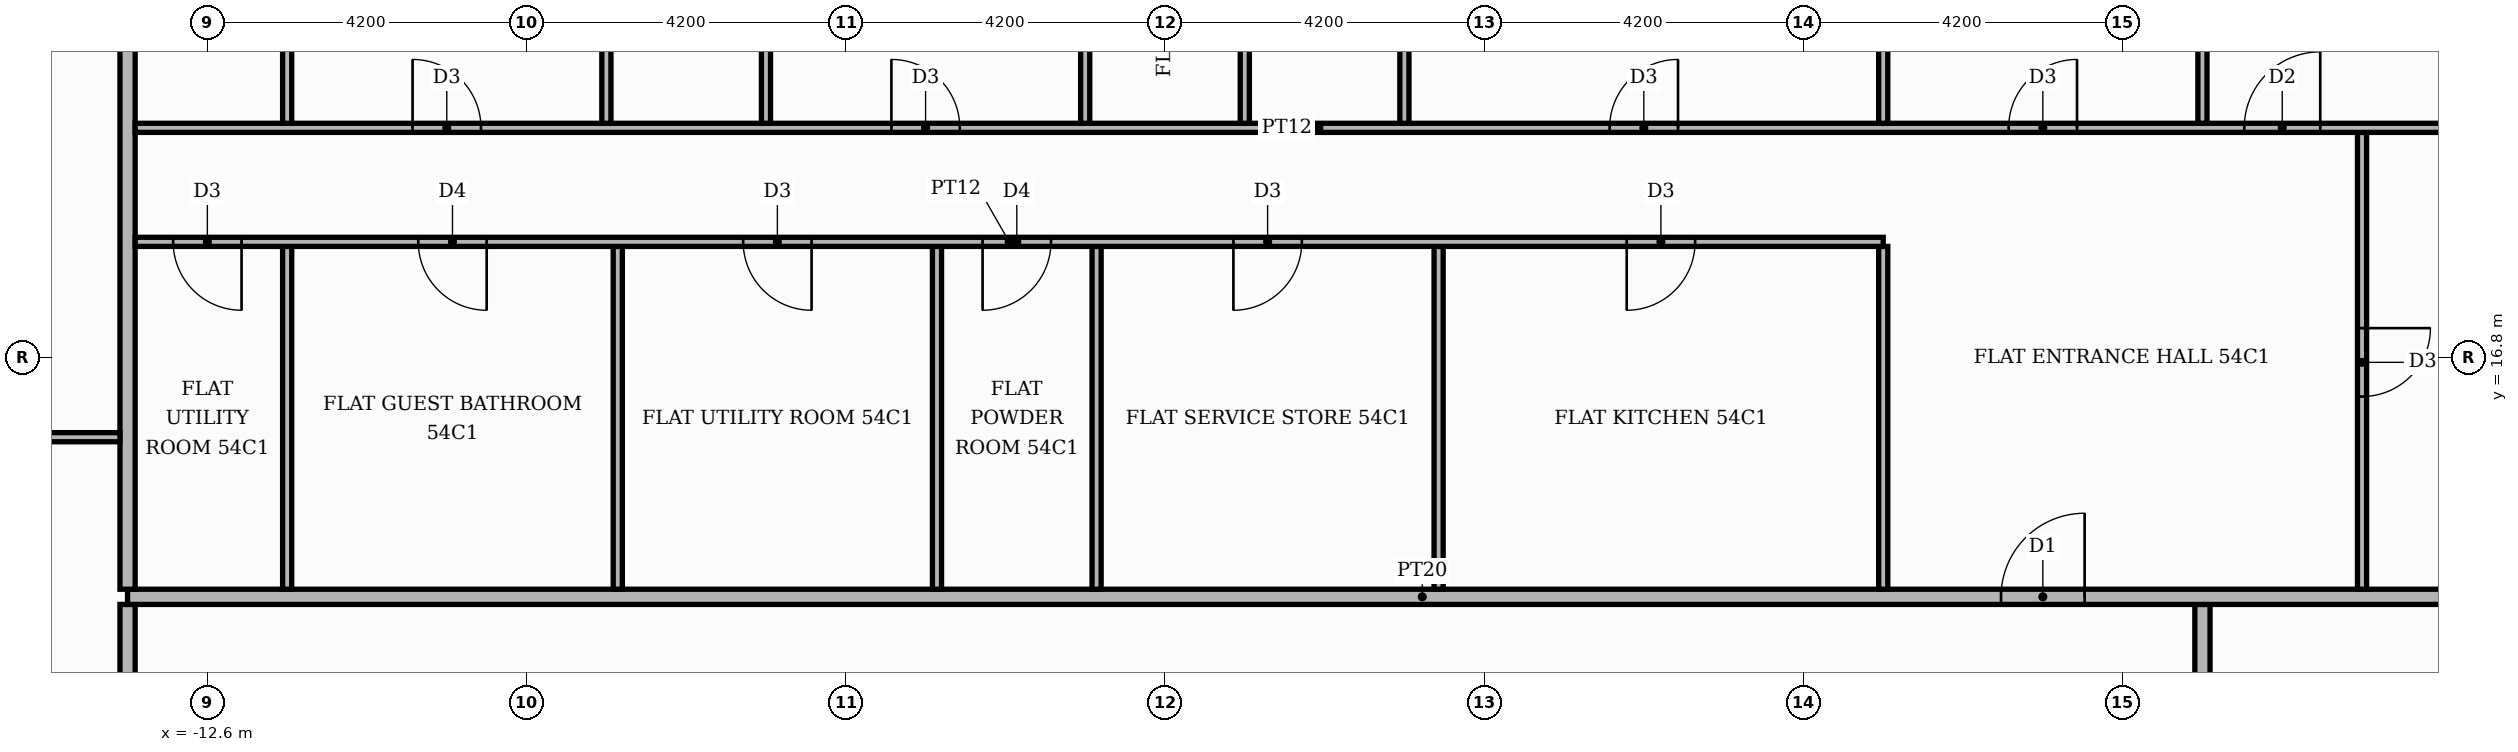
"""IFC4 building model, lengths in metres.
Left out: names, types, materials, properties, quantities, classifications, styles, units other than length and angle.
Written with IfcOpenShell. Run it as: python <this file> out.ifc"""

import sys

from ifc_helpers import new_model, si_unit, direction, frame, frame_2d, origin, place, context, subcontext, project, spatial, rectangle, extrude, element, fill, save


model = new_model("IFC4")
c1 = context("Model", 3, precision=1e-05, world=origin(), true_north=direction((0.0, 1.0)))
c2 = subcontext(c1, "Body", "Model", "MODEL_VIEW")
j1 = project(units=[si_unit("LENGTHUNIT", "METRE"), si_unit("PLANEANGLEUNIT", "RADIAN")], contexts=[c1])
p1 = place(None, origin())
s1 = spatial("IfcSite", under=j1, at=p1, CompositionType="ELEMENT")
p2 = place(p1, origin())
s2 = spatial("IfcBuilding", under=s1, at=p2, CompositionType="ELEMENT")
p3 = place(p2, frame((0.0, 0.0, 227.4)))
s3 = spatial("IfcBuildingStorey", under=s2, at=p3, CompositionType="ELEMENT", Elevation=227.4)
p4 = place(p3, frame((-13.65, -13.55, 0.0), z_axis=(0.0, 0.0, 1.0), x_axis=(0.0, 1.0, 0.0)))
e1 = element("IfcWall", 1, at=p4, inside=s3, PredefinedType="PARTITIONING", context=c2, shape_type="SweptSolid", body=[
    extrude(rectangle(XDim=27.1, YDim=0.2, at=frame_2d((13.55, 0.0))), origin(), (0.0, 0.0, 1.0), 3.48),
])
p5 = place(p4, frame((24.55, 0.0, 0.0)))
e2 = element("IfcOpeningElement", 2, at=p5, cuts=e1, PredefinedType="OPENING", context=c2, shape_type="SweptSolid", body=[
    extrude(rectangle(XDim=1.1, YDim=2.4, at=frame_2d((0.55, 1.2))), frame((0.0, 0.11, 0.0), z_axis=(0.0, -1.0, 0.0), x_axis=(1.0, 0.0, 0.0)), (0.0, 0.0, 1.0), 0.22),
])
p6 = place(p3, frame((13.65, 11.1, 0.0), z_axis=(0.0, 0.0, 1.0), x_axis=(0.0, 1.0, 0.0)))
e3 = element("IfcWall", 3, at=p6, inside=s3, PredefinedType="PARTITIONING", context=c2, shape_type="SweptSolid", body=[
    extrude(rectangle(XDim=2.45, YDim=0.2, at=frame_2d((1.225, 0.0))), origin(), (0.0, 0.0, 1.0), 3.48),
])
p7 = place(p3, frame((-13.65, 13.65, 0.0), z_axis=(0.0, 0.0, 1.0), x_axis=(1.0, 0.0, 0.0)))
e4 = element("IfcWall", 4, at=p7, inside=s3, PredefinedType="PARTITIONING", context=c2, shape_type="SweptSolid", body=[
    extrude(rectangle(XDim=34.07, YDim=0.2, at=frame_2d((17.035, 0.0))), origin(), (0.0, 0.0, 1.0), 3.48),
])
p8 = place(p7, frame((24.65, 0.0, 0.0)))
e5 = element("IfcOpeningElement", 5, at=p8, cuts=e4, PredefinedType="OPENING", context=c2, shape_type="SweptSolid", body=[
    extrude(rectangle(XDim=1.1, YDim=2.4, at=frame_2d((0.55, 1.2))), frame((0.0, 0.11, 0.0), z_axis=(0.0, -1.0, 0.0), x_axis=(1.0, 0.0, 0.0)), (0.0, 0.0, 1.0), 0.22),
])
p9 = place(p3, frame((-13.65, 13.75, 0.0), z_axis=(0.0, 0.0, 1.0), x_axis=(0.0, 1.0, 0.0)))
e6 = element("IfcWall", 6, at=p9, inside=s3, PredefinedType="PARTITIONING", context=c2, shape_type="SweptSolid", body=[
    extrude(rectangle(XDim=11.67, YDim=0.2, at=frame_2d((5.835, 0.0))), origin(), (0.0, 0.0, 1.0), 3.48),
])
for number, where, z_axis, x_axis in (
    (7, (-11.55, 13.75, 0.0), (0.0, 0.0, 1.0), (0.0, 1.0, 0.0)),
    (8, (-7.2, 13.75, 0.0), (0.0, 0.0, 1.0), (0.0, 1.0, 0.0)),
    (9, (-3.0, 13.75, 0.0), (0.0, 0.0, 1.0), (0.0, 1.0, 0.0)),
    (10, (-0.9, 13.75, 0.0), (0.0, 0.0, 1.0), (0.0, 1.0, 0.0)),
    (11, (3.6, 13.75, 0.0), (0.0, 0.0, 1.0), (0.0, 1.0, 0.0)),
    (12, (9.45, 13.75, 0.0), (0.0, 0.0, 1.0), (0.0, 1.0, 0.0)),
):
    element("IfcWall", number, at=place(p3, frame(where, z_axis=z_axis, x_axis=x_axis)), inside=s3, PredefinedType="PARTITIONING", context=c2, shape_type="SweptSolid", body=[
        extrude(rectangle(XDim=4.51, YDim=0.12, at=frame_2d((2.255, 0.0))), origin(), (0.0, 0.0, 1.0), 3.48),
    ])
p10 = place(p3, frame((15.75, 13.75, 0.0), z_axis=(0.0, 0.0, 1.0), x_axis=(0.0, 1.0, 0.0)))
e13 = element("IfcWall", 13, at=p10, inside=s3, PredefinedType="PARTITIONING", context=c2, shape_type="SweptSolid", body=[
    extrude(rectangle(XDim=6.01, YDim=0.12, at=frame_2d((3.005, 0.0))), origin(), (0.0, 0.0, 1.0), 3.48),
])
p11 = place(p10, frame((2.535, 0.0, 0.0)))
e14 = element("IfcOpeningElement", 14, at=p11, cuts=e13, PredefinedType="OPENING", context=c2, shape_type="SweptSolid", body=[
    extrude(rectangle(XDim=0.9, YDim=2.1, at=frame_2d((0.45, 1.05))), frame((0.0, 0.07, 0.0), z_axis=(0.0, -1.0, 0.0), x_axis=(1.0, 0.0, 0.0)), (0.0, 0.0, 1.0), 0.14),
])
p12 = place(p3, frame((-20.72, 15.75, 0.0), z_axis=(0.0, 0.0, 1.0), x_axis=(1.0, 0.0, 0.0)))
e15 = element("IfcWall", 15, at=p12, inside=s3, PredefinedType="PARTITIONING", context=c2, shape_type="SweptSolid", body=[
    extrude(rectangle(XDim=6.97, YDim=0.12, at=frame_2d((3.485, 0.0))), origin(), (0.0, 0.0, 1.0), 3.48),
])
p13 = place(p12, frame((3.085, 0.0, 0.0)))
e16 = element("IfcOpeningElement", 16, at=p13, cuts=e15, PredefinedType="OPENING", context=c2, shape_type="SweptSolid", body=[
    extrude(rectangle(XDim=0.9, YDim=2.1, at=frame_2d((0.45, 1.05))), frame((0.0, 0.07, 0.0), z_axis=(0.0, -1.0, 0.0), x_axis=(1.0, 0.0, 0.0)), (0.0, 0.0, 1.0), 0.14),
])
p14 = place(p3, frame((-13.55, 18.32, 0.0), z_axis=(0.0, 0.0, 1.0), x_axis=(1.0, 0.0, 0.0)))
e17 = element("IfcWall", 17, at=p14, inside=s3, PredefinedType="PARTITIONING", context=c2, shape_type="SweptSolid", body=[
    extrude(rectangle(XDim=23.0, YDim=0.12, at=frame_2d((11.5, 0.0))), origin(), (0.0, 0.0, 1.0), 3.48),
])
p15 = place(p14, frame((19.625, 0.0, 0.0)))
e18 = element("IfcOpeningElement", 18, at=p15, cuts=e17, PredefinedType="OPENING", context=c2, shape_type="SweptSolid", body=[
    extrude(rectangle(XDim=0.9, YDim=2.1, at=frame_2d((0.45, 1.05))), frame((0.0, 0.07, 0.0), z_axis=(0.0, -1.0, 0.0), x_axis=(1.0, 0.0, 0.0)), (0.0, 0.0, 1.0), 0.14),
])
p16 = place(p14, frame((14.45, 0.0, 0.0)))
e19 = element("IfcOpeningElement", 19, at=p16, cuts=e17, PredefinedType="OPENING", context=c2, shape_type="SweptSolid", body=[
    extrude(rectangle(XDim=0.9, YDim=2.1, at=frame_2d((0.45, 1.05))), frame((0.0, 0.07, 0.0), z_axis=(0.0, -1.0, 0.0), x_axis=(1.0, 0.0, 0.0)), (0.0, 0.0, 1.0), 0.14),
])
p17 = place(p14, frame((11.15, 0.0, 0.0)))
e20 = element("IfcOpeningElement", 20, at=p17, cuts=e17, PredefinedType="OPENING", context=c2, shape_type="SweptSolid", body=[
    extrude(rectangle(XDim=0.9, YDim=2.1, at=frame_2d((0.45, 1.05))), frame((0.0, 0.07, 0.0), z_axis=(0.0, -1.0, 0.0), x_axis=(1.0, 0.0, 0.0)), (0.0, 0.0, 1.0), 0.14),
])
p18 = place(p14, frame((8.0, 0.0, 0.0)))
e21 = element("IfcOpeningElement", 21, at=p18, cuts=e17, PredefinedType="OPENING", context=c2, shape_type="SweptSolid", body=[
    extrude(rectangle(XDim=0.9, YDim=2.1, at=frame_2d((0.45, 1.05))), frame((0.0, 0.07, 0.0), z_axis=(0.0, -1.0, 0.0), x_axis=(1.0, 0.0, 0.0)), (0.0, 0.0, 1.0), 0.14),
])
p19 = place(p14, frame((3.725, 0.0, 0.0)))
e22 = element("IfcOpeningElement", 22, at=p19, cuts=e17, PredefinedType="OPENING", context=c2, shape_type="SweptSolid", body=[
    extrude(rectangle(XDim=0.9, YDim=2.1, at=frame_2d((0.45, 1.05))), frame((0.0, 0.07, 0.0), z_axis=(0.0, -1.0, 0.0), x_axis=(1.0, 0.0, 0.0)), (0.0, 0.0, 1.0), 0.14),
])
p20 = place(p14, frame((0.5, 0.0, 0.0)))
e23 = element("IfcOpeningElement", 23, at=p20, cuts=e17, PredefinedType="OPENING", context=c2, shape_type="SweptSolid", body=[
    extrude(rectangle(XDim=0.9, YDim=2.1, at=frame_2d((0.45, 1.05))), frame((0.0, 0.07, 0.0), z_axis=(0.0, -1.0, 0.0), x_axis=(1.0, 0.0, 0.0)), (0.0, 0.0, 1.0), 0.14),
])
p21 = place(p3, frame((-13.55, 19.82, 0.0), z_axis=(0.0, 0.0, 1.0), x_axis=(1.0, 0.0, 0.0)))
e24 = element("IfcWall", 24, at=p21, inside=s3, PredefinedType="PARTITIONING", context=c2, shape_type="SweptSolid", body=[
    extrude(rectangle(XDim=31.15, YDim=0.12, at=frame_2d((15.575, 0.0))), origin(), (0.0, 0.0, 1.0), 3.48),
])
p22 = place(p21, frame((27.75, 0.0, 0.0)))
e25 = element("IfcOpeningElement", 25, at=p22, cuts=e24, PredefinedType="OPENING", context=c2, shape_type="SweptSolid", body=[
    extrude(rectangle(XDim=1.0, YDim=2.1, at=frame_2d((0.5, 1.05))), frame((0.0, 0.07, 0.0), z_axis=(0.0, -1.0, 0.0), x_axis=(1.0, 0.0, 0.0)), (0.0, 0.0, 1.0), 0.14),
])
p23 = place(p21, frame((24.65, 0.0, 0.0)))
e26 = element("IfcOpeningElement", 26, at=p23, cuts=e24, PredefinedType="OPENING", context=c2, shape_type="SweptSolid", body=[
    extrude(rectangle(XDim=0.9, YDim=2.1, at=frame_2d((0.45, 1.05))), frame((0.0, 0.07, 0.0), z_axis=(0.0, -1.0, 0.0), x_axis=(1.0, 0.0, 0.0)), (0.0, 0.0, 1.0), 0.14),
])
p24 = place(p21, frame((19.4, 0.0, 0.0)))
e27 = element("IfcOpeningElement", 27, at=p24, cuts=e24, PredefinedType="OPENING", context=c2, shape_type="SweptSolid", body=[
    extrude(rectangle(XDim=0.9, YDim=2.1, at=frame_2d((0.45, 1.05))), frame((0.0, 0.07, 0.0), z_axis=(0.0, -1.0, 0.0), x_axis=(1.0, 0.0, 0.0)), (0.0, 0.0, 1.0), 0.14),
])
p25 = place(p21, frame((9.95, 0.0, 0.0)))
e28 = element("IfcOpeningElement", 28, at=p25, cuts=e24, PredefinedType="OPENING", context=c2, shape_type="SweptSolid", body=[
    extrude(rectangle(XDim=0.9, YDim=2.1, at=frame_2d((0.45, 1.05))), frame((0.0, 0.07, 0.0), z_axis=(0.0, -1.0, 0.0), x_axis=(1.0, 0.0, 0.0)), (0.0, 0.0, 1.0), 0.14),
])
p26 = place(p21, frame((3.65, 0.0, 0.0)))
e29 = element("IfcOpeningElement", 29, at=p26, cuts=e24, PredefinedType="OPENING", context=c2, shape_type="SweptSolid", body=[
    extrude(rectangle(XDim=0.9, YDim=2.1, at=frame_2d((0.45, 1.05))), frame((0.0, 0.07, 0.0), z_axis=(0.0, -1.0, 0.0), x_axis=(1.0, 0.0, 0.0)), (0.0, 0.0, 1.0), 0.14),
])
p27 = place(p3, frame((-11.55, 19.88, 0.0), z_axis=(0.0, 0.0, 1.0), x_axis=(0.0, 1.0, 0.0)))
e30 = element("IfcWall", 30, at=p27, inside=s3, PredefinedType="PARTITIONING", context=c2, shape_type="SweptSolid", body=[
    extrude(rectangle(XDim=5.54, YDim=0.12, at=frame_2d((2.77, 0.0))), origin(), (0.0, 0.0, 1.0), 3.48),
])
p28 = place(p27, frame((2.44, 0.0, 0.0)))
e31 = element("IfcOpeningElement", 31, at=p28, cuts=e30, PredefinedType="OPENING", context=c2, shape_type="SweptSolid", body=[
    extrude(rectangle(XDim=0.9, YDim=2.1, at=frame_2d((0.45, 1.05))), frame((0.0, 0.07, 0.0), z_axis=(0.0, -1.0, 0.0), x_axis=(1.0, 0.0, 0.0)), (0.0, 0.0, 1.0), 0.14),
])
p29 = place(p3, frame((-7.35, 19.88, 0.0), z_axis=(0.0, 0.0, 1.0), x_axis=(0.0, 1.0, 0.0)))
e32 = element("IfcWall", 32, at=p29, inside=s3, PredefinedType="PARTITIONING", context=c2, shape_type="SweptSolid", body=[
    extrude(rectangle(XDim=5.54, YDim=0.12, at=frame_2d((2.77, 0.0))), origin(), (0.0, 0.0, 1.0), 3.48),
])
p30 = place(p3, frame((-5.25, 19.88, 0.0), z_axis=(0.0, 0.0, 1.0), x_axis=(0.0, 1.0, 0.0)))
e33 = element("IfcWall", 33, at=p30, inside=s3, PredefinedType="PARTITIONING", context=c2, shape_type="SweptSolid", body=[
    extrude(rectangle(XDim=5.54, YDim=0.12, at=frame_2d((2.77, 0.0))), origin(), (0.0, 0.0, 1.0), 3.48),
])
p31 = place(p30, frame((2.44, 0.0, 0.0)))
e34 = element("IfcOpeningElement", 34, at=p31, cuts=e33, PredefinedType="OPENING", context=c2, shape_type="SweptSolid", body=[
    extrude(rectangle(XDim=0.9, YDim=2.1, at=frame_2d((0.45, 1.05))), frame((0.0, 0.07, 0.0), z_axis=(0.0, -1.0, 0.0), x_axis=(1.0, 0.0, 0.0)), (0.0, 0.0, 1.0), 0.14),
])
p32 = place(p3, frame((-1.05, 19.88, 0.0), z_axis=(0.0, 0.0, 1.0), x_axis=(0.0, 1.0, 0.0)))
e35 = element("IfcWall", 35, at=p32, inside=s3, PredefinedType="PARTITIONING", context=c2, shape_type="SweptSolid", body=[
    extrude(rectangle(XDim=5.54, YDim=0.12, at=frame_2d((2.77, 0.0))), origin(), (0.0, 0.0, 1.0), 3.48),
])
p33 = place(p3, frame((1.05, 19.88, 0.0), z_axis=(0.0, 0.0, 1.0), x_axis=(0.0, 1.0, 0.0)))
e36 = element("IfcWall", 36, at=p33, inside=s3, PredefinedType="PARTITIONING", context=c2, shape_type="SweptSolid", body=[
    extrude(rectangle(XDim=5.54, YDim=0.12, at=frame_2d((2.77, 0.0))), origin(), (0.0, 0.0, 1.0), 3.48),
])
p34 = place(p33, frame((2.44, 0.0, 0.0)))
e37 = element("IfcOpeningElement", 37, at=p34, cuts=e36, PredefinedType="OPENING", context=c2, shape_type="SweptSolid", body=[
    extrude(rectangle(XDim=0.9, YDim=2.1, at=frame_2d((0.45, 1.05))), frame((0.0, 0.07, 0.0), z_axis=(0.0, -1.0, 0.0), x_axis=(1.0, 0.0, 0.0)), (0.0, 0.0, 1.0), 0.14),
])
p35 = place(p3, frame((3.15, 19.88, 0.0), z_axis=(0.0, 0.0, 1.0), x_axis=(0.0, 1.0, 0.0)))
e38 = element("IfcWall", 38, at=p35, inside=s3, PredefinedType="PARTITIONING", context=c2, shape_type="SweptSolid", body=[
    extrude(rectangle(XDim=5.54, YDim=0.12, at=frame_2d((2.77, 0.0))), origin(), (0.0, 0.0, 1.0), 3.48),
])
p36 = place(p35, frame((2.44, 0.0, 0.0)))
e39 = element("IfcOpeningElement", 39, at=p36, cuts=e38, PredefinedType="OPENING", context=c2, shape_type="SweptSolid", body=[
    extrude(rectangle(XDim=0.9, YDim=2.1, at=frame_2d((0.45, 1.05))), frame((0.0, 0.07, 0.0), z_axis=(0.0, -1.0, 0.0), x_axis=(1.0, 0.0, 0.0)), (0.0, 0.0, 1.0), 0.14),
])
for number, where, z_axis, x_axis in (
    (40, (9.45, 19.88, 0.0), (0.0, 0.0, 1.0), (0.0, 1.0, 0.0)),
    (41, (13.65, 19.88, 0.0), (0.0, 0.0, 1.0), (0.0, 1.0, 0.0)),
):
    element("IfcWall", number, at=place(p3, frame(where, z_axis=z_axis, x_axis=x_axis)), inside=s3, PredefinedType="PARTITIONING", context=c2, shape_type="SweptSolid", body=[
        extrude(rectangle(XDim=5.54, YDim=0.12, at=frame_2d((2.77, 0.0))), origin(), (0.0, 0.0, 1.0), 3.48),
    ])
p37 = place(p8, origin())
e42 = element("IfcDoor", 42, at=p37, inside=s3, OperationType="SINGLE_SWING_RIGHT", PredefinedType="DOOR", context=c2, shape_type="SweptSolid", body=[
    extrude(rectangle(XDim=1.1, YDim=2.4, at=frame_2d((0.55, 1.2))), frame((0.0, 0.025, 0.0), z_axis=(0.0, -1.0, 0.0), x_axis=(1.0, 0.0, 0.0)), (0.0, 0.0, 1.0), 0.05),
])
fill(e5, e42)
p38 = place(p11, frame((0.9, 0.0, 0.0), z_axis=(0.0, 0.0, 1.0), x_axis=(-1.0, 0.0, 0.0)))
e43 = element("IfcDoor", 43, at=p38, inside=s3, OperationType="SINGLE_SWING_RIGHT", PredefinedType="DOOR", context=c2, shape_type="SweptSolid", body=[
    extrude(rectangle(XDim=0.9, YDim=2.1, at=frame_2d((0.45, 1.05))), frame((0.0, 0.025, 0.0), z_axis=(0.0, -1.0, 0.0), x_axis=(1.0, 0.0, 0.0)), (0.0, 0.0, 1.0), 0.05),
])
fill(e14, e43)
p39 = place(p15, frame((0.9, 0.0, 0.0), z_axis=(0.0, 0.0, 1.0), x_axis=(-1.0, 0.0, 0.0)))
e44 = element("IfcDoor", 44, at=p39, inside=s3, OperationType="SINGLE_SWING_LEFT", PredefinedType="DOOR", context=c2, shape_type="SweptSolid", body=[
    extrude(rectangle(XDim=0.9, YDim=2.1, at=frame_2d((0.45, 1.05))), frame((0.0, 0.025, 0.0), z_axis=(0.0, -1.0, 0.0), x_axis=(1.0, 0.0, 0.0)), (0.0, 0.0, 1.0), 0.05),
])
fill(e18, e44)
p40 = place(p16, frame((0.9, 0.0, 0.0), z_axis=(0.0, 0.0, 1.0), x_axis=(-1.0, 0.0, 0.0)))
e45 = element("IfcDoor", 45, at=p40, inside=s3, OperationType="SINGLE_SWING_LEFT", PredefinedType="DOOR", context=c2, shape_type="SweptSolid", body=[
    extrude(rectangle(XDim=0.9, YDim=2.1, at=frame_2d((0.45, 1.05))), frame((0.0, 0.025, 0.0), z_axis=(0.0, -1.0, 0.0), x_axis=(1.0, 0.0, 0.0)), (0.0, 0.0, 1.0), 0.05),
])
fill(e19, e45)
p41 = place(p17, frame((0.9, 0.0, 0.0), z_axis=(0.0, 0.0, 1.0), x_axis=(-1.0, 0.0, 0.0)))
e46 = element("IfcDoor", 46, at=p41, inside=s3, OperationType="SINGLE_SWING_LEFT", PredefinedType="DOOR", context=c2, shape_type="SweptSolid", body=[
    extrude(rectangle(XDim=0.9, YDim=2.1, at=frame_2d((0.45, 1.05))), frame((0.0, 0.025, 0.0), z_axis=(0.0, -1.0, 0.0), x_axis=(1.0, 0.0, 0.0)), (0.0, 0.0, 1.0), 0.05),
])
fill(e20, e46)
p42 = place(p18, frame((0.9, 0.0, 0.0), z_axis=(0.0, 0.0, 1.0), x_axis=(-1.0, 0.0, 0.0)))
e47 = element("IfcDoor", 47, at=p42, inside=s3, OperationType="SINGLE_SWING_RIGHT", PredefinedType="DOOR", context=c2, shape_type="SweptSolid", body=[
    extrude(rectangle(XDim=0.9, YDim=2.1, at=frame_2d((0.45, 1.05))), frame((0.0, 0.025, 0.0), z_axis=(0.0, -1.0, 0.0), x_axis=(1.0, 0.0, 0.0)), (0.0, 0.0, 1.0), 0.05),
])
fill(e21, e47)
p43 = place(p19, frame((0.9, 0.0, 0.0), z_axis=(0.0, 0.0, 1.0), x_axis=(-1.0, 0.0, 0.0)))
e48 = element("IfcDoor", 48, at=p43, inside=s3, OperationType="SINGLE_SWING_RIGHT", PredefinedType="DOOR", context=c2, shape_type="SweptSolid", body=[
    extrude(rectangle(XDim=0.9, YDim=2.1, at=frame_2d((0.45, 1.05))), frame((0.0, 0.025, 0.0), z_axis=(0.0, -1.0, 0.0), x_axis=(1.0, 0.0, 0.0)), (0.0, 0.0, 1.0), 0.05),
])
fill(e22, e48)
p44 = place(p20, frame((0.9, 0.0, 0.0), z_axis=(0.0, 0.0, 1.0), x_axis=(-1.0, 0.0, 0.0)))
e49 = element("IfcDoor", 49, at=p44, inside=s3, OperationType="SINGLE_SWING_RIGHT", PredefinedType="DOOR", context=c2, shape_type="SweptSolid", body=[
    extrude(rectangle(XDim=0.9, YDim=2.1, at=frame_2d((0.45, 1.05))), frame((0.0, 0.025, 0.0), z_axis=(0.0, -1.0, 0.0), x_axis=(1.0, 0.0, 0.0)), (0.0, 0.0, 1.0), 0.05),
])
fill(e23, e49)
p45 = place(p22, origin())
e50 = element("IfcDoor", 50, at=p45, inside=s3, OperationType="SINGLE_SWING_RIGHT", PredefinedType="DOOR", context=c2, shape_type="SweptSolid", body=[
    extrude(rectangle(XDim=1.0, YDim=2.1, at=frame_2d((0.5, 1.05))), frame((0.0, 0.025, 0.0), z_axis=(0.0, -1.0, 0.0), x_axis=(1.0, 0.0, 0.0)), (0.0, 0.0, 1.0), 0.05),
])
fill(e25, e50)
p46 = place(p23, origin())
e51 = element("IfcDoor", 51, at=p46, inside=s3, OperationType="SINGLE_SWING_RIGHT", PredefinedType="DOOR", context=c2, shape_type="SweptSolid", body=[
    extrude(rectangle(XDim=0.9, YDim=2.1, at=frame_2d((0.45, 1.05))), frame((0.0, 0.025, 0.0), z_axis=(0.0, -1.0, 0.0), x_axis=(1.0, 0.0, 0.0)), (0.0, 0.0, 1.0), 0.05),
])
fill(e26, e51)
p47 = place(p24, origin())
e52 = element("IfcDoor", 52, at=p47, inside=s3, OperationType="SINGLE_SWING_RIGHT", PredefinedType="DOOR", context=c2, shape_type="SweptSolid", body=[
    extrude(rectangle(XDim=0.9, YDim=2.1, at=frame_2d((0.45, 1.05))), frame((0.0, 0.025, 0.0), z_axis=(0.0, -1.0, 0.0), x_axis=(1.0, 0.0, 0.0)), (0.0, 0.0, 1.0), 0.05),
])
fill(e27, e52)
p48 = place(p25, origin())
e53 = element("IfcDoor", 53, at=p48, inside=s3, OperationType="SINGLE_SWING_LEFT", PredefinedType="DOOR", context=c2, shape_type="SweptSolid", body=[
    extrude(rectangle(XDim=0.9, YDim=2.1, at=frame_2d((0.45, 1.05))), frame((0.0, 0.025, 0.0), z_axis=(0.0, -1.0, 0.0), x_axis=(1.0, 0.0, 0.0)), (0.0, 0.0, 1.0), 0.05),
])
fill(e28, e53)
p49 = place(p26, origin())
e54 = element("IfcDoor", 54, at=p49, inside=s3, OperationType="SINGLE_SWING_LEFT", PredefinedType="DOOR", context=c2, shape_type="SweptSolid", body=[
    extrude(rectangle(XDim=0.9, YDim=2.1, at=frame_2d((0.45, 1.05))), frame((0.0, 0.025, 0.0), z_axis=(0.0, -1.0, 0.0), x_axis=(1.0, 0.0, 0.0)), (0.0, 0.0, 1.0), 0.05),
])
fill(e29, e54)
save(model, sys.argv[1])
